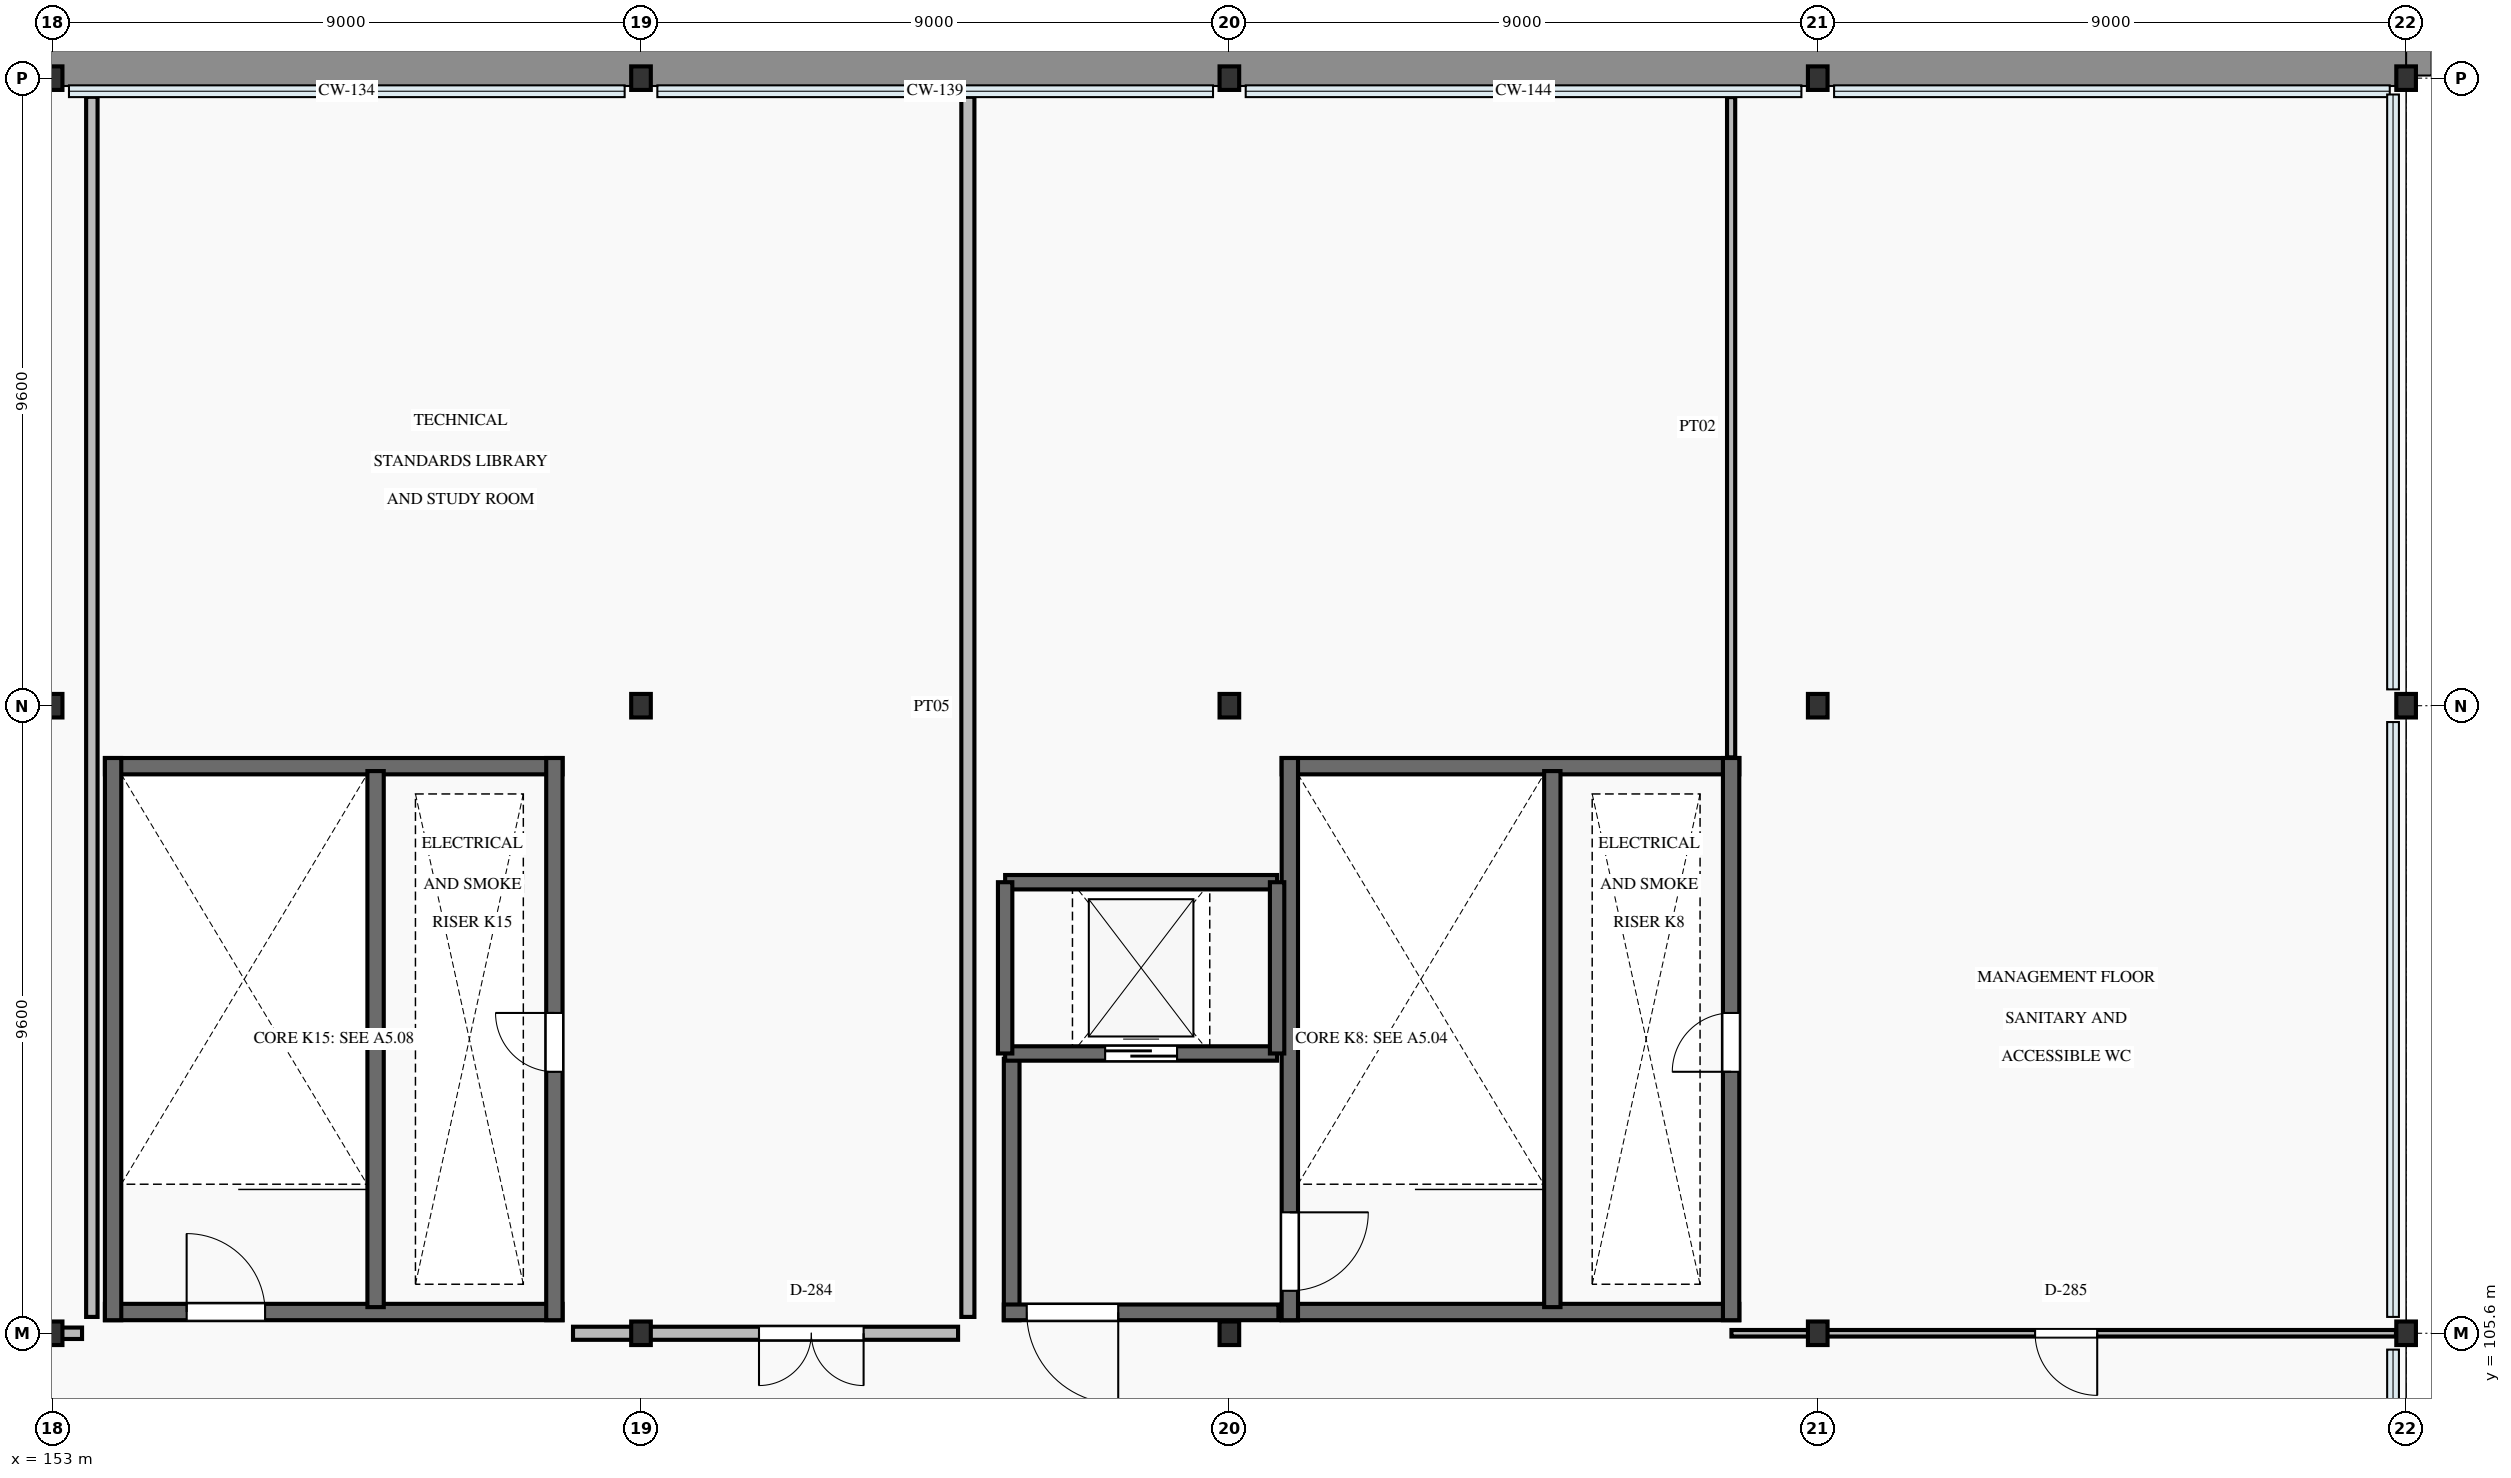
"""IFC4 building model, lengths in metres.
Left out: names, types, materials, properties, quantities, classifications, styles, units other than length and angle.
Written with IfcOpenShell. Run it as: python <this file> out.ifc"""

import sys

from ifc_helpers import new_model, si_unit, direction, frame, frame_2d, origin, origin_2d, place, context, subcontext, project, spatial, rectangle, i_section, extrude, element, fill, save


model = new_model("IFC4")
c1 = context("Model", 3, precision=1e-05, world=origin(), true_north=direction((0.0, 1.0)))
c2 = subcontext(c1, "Body", "Model", "MODEL_VIEW")
j1 = project(units=[si_unit("LENGTHUNIT", "METRE"), si_unit("PLANEANGLEUNIT", "RADIAN")], contexts=[c1])
p1 = place(None, origin())
s1 = spatial("IfcSite", under=j1, at=p1, CompositionType="ELEMENT")
p2 = place(p1, origin())
s2 = spatial("IfcBuilding", under=s1, at=p2, CompositionType="ELEMENT")
p3 = place(p2, frame((0.0, 0.0, 18.9)))
s3 = spatial("IfcBuildingStorey", under=s2, at=p3, CompositionType="ELEMENT", Elevation=18.9)
for number, where, z_axis, x_axis in (
    (1, (153.0, 105.6, 0.0), (0.0, 0.0, 1.0), (1.0, 0.0, 0.0)),
    (2, (153.0, 115.2, 0.0), (0.0, 0.0, 1.0), (1.0, 0.0, 0.0)),
    (3, (153.0, 124.8, 0.0), (0.0, 0.0, 1.0), (1.0, 0.0, 0.0)),
    (4, (162.0, 105.6, 0.0), (0.0, 0.0, 1.0), (1.0, 0.0, 0.0)),
    (5, (162.0, 115.2, 0.0), (0.0, 0.0, 1.0), (1.0, 0.0, 0.0)),
    (6, (162.0, 124.8, 0.0), (0.0, 0.0, 1.0), (1.0, 0.0, 0.0)),
    (7, (171.0, 105.6, 0.0), (0.0, 0.0, 1.0), (1.0, 0.0, 0.0)),
    (8, (171.0, 115.2, 0.0), (0.0, 0.0, 1.0), (1.0, 0.0, 0.0)),
    (9, (171.0, 124.8, 0.0), (0.0, 0.0, 1.0), (1.0, 0.0, 0.0)),
    (10, (180.0, 105.6, 0.0), (0.0, 0.0, 1.0), (1.0, 0.0, 0.0)),
    (11, (180.0, 115.2, 0.0), (0.0, 0.0, 1.0), (1.0, 0.0, 0.0)),
    (12, (180.0, 124.8, 0.0), (0.0, 0.0, 1.0), (1.0, 0.0, 0.0)),
    (13, (189.0, 105.6, 0.0), (0.0, 0.0, 1.0), (1.0, 0.0, 0.0)),
    (14, (189.0, 115.2, 0.0), (0.0, 0.0, 1.0), (1.0, 0.0, 0.0)),
    (15, (189.0, 124.8, 0.0), (0.0, 0.0, 1.0), (1.0, 0.0, 0.0)),
):
    element("IfcColumn", number, at=place(p3, frame(where, z_axis=z_axis, x_axis=x_axis)), inside=s3, PredefinedType="COLUMN", context=c2, shape_type="SweptSolid", body=[
        extrude(i_section(OverallWidth=0.3, OverallDepth=0.36, WebThickness=0.012, FlangeThickness=0.022, FilletRadius=0.027, at=origin_2d()), origin(), (0.0, 0.0, 1.0), 3.9),
    ])
for number, where, z_axis, x_axis in (
    (16, (171.8, 105.925, 0.0), (0.0, 0.0, 1.0), (1.0, 0.0, 0.0)),
    (17, (171.8, 114.275, 0.0), (0.0, 0.0, 1.0), (1.0, 0.0, 0.0)),
):
    element("IfcWall", number, at=place(p3, frame(where, z_axis=z_axis, x_axis=x_axis)), inside=s3, PredefinedType="SHEAR", context=c2, shape_type="SweptSolid", body=[
        extrude(rectangle(XDim=7.0, YDim=0.25, at=frame_2d((3.5, 0.0))), origin(), (0.0, 0.0, 1.0), 3.9),
    ])
p4 = place(p3, frame((171.925, 105.8, 0.0), z_axis=(0.0, 0.0, 1.0), x_axis=(0.0, 1.0, 0.0)))
e18 = element("IfcWall", 18, at=p4, inside=s3, PredefinedType="SHEAR", context=c2, shape_type="SweptSolid", body=[
    extrude(rectangle(XDim=8.6, YDim=0.25, at=frame_2d((4.3, 0.0))), origin(), (0.0, 0.0, 1.0), 3.9),
])
p5 = place(p4, frame((0.45, 0.0, 0.0)))
e19 = element("IfcOpeningElement", 19, at=p5, cuts=e18, PredefinedType="OPENING", context=c2, shape_type="SweptSolid", body=[
    extrude(rectangle(XDim=1.2, YDim=2.15, at=frame_2d((0.6, 1.075))), frame((0.0, 0.14, 0.0), z_axis=(0.0, -1.0, 0.0), x_axis=(1.0, 0.0, 0.0)), (0.0, 0.0, 1.0), 0.28),
])
p6 = place(p3, frame((178.675, 105.8, 0.0), z_axis=(0.0, 0.0, 1.0), x_axis=(0.0, 1.0, 0.0)))
e20 = element("IfcWall", 20, at=p6, inside=s3, PredefinedType="SHEAR", context=c2, shape_type="SweptSolid", body=[
    extrude(rectangle(XDim=8.6, YDim=0.25, at=frame_2d((4.3, 0.0))), origin(), (0.0, 0.0, 1.0), 3.9),
])
p7 = place(p6, frame((3.8, 0.0, 0.0)))
e21 = element("IfcOpeningElement", 21, at=p7, cuts=e20, PredefinedType="OPENING", context=c2, shape_type="SweptSolid", body=[
    extrude(rectangle(XDim=0.9, YDim=2.05, at=frame_2d((0.45, 1.025))), frame((0.0, 0.14, 0.0), z_axis=(0.0, -1.0, 0.0), x_axis=(1.0, 0.0, 0.0)), (0.0, 0.0, 1.0), 0.28),
])
p8 = place(p3, frame((175.94, 106.0, 0.0), z_axis=(0.0, 0.0, 1.0), x_axis=(0.0, 1.0, 0.0)))
e22 = element("IfcWall", 22, at=p8, inside=s3, PredefinedType="SHEAR", context=c2, shape_type="SweptSolid", body=[
    extrude(rectangle(XDim=8.2, YDim=0.25, at=frame_2d((4.1, 0.0))), origin(), (0.0, 0.0, 1.0), 3.9),
])
p9 = place(p3, frame((167.67, 105.8, 0.0), z_axis=(0.0, 0.0, 1.0), x_axis=(0.0, 1.0, 0.0)))
e23 = element("IfcWall", 23, at=p9, inside=s3, PredefinedType="SHEAR", context=c2, shape_type="SweptSolid", body=[
    extrude(rectangle(XDim=4.0, YDim=0.24, at=frame_2d((2.0, 0.0))), origin(), (0.0, 0.0, 1.0), 3.9),
])
p10 = place(p3, frame((167.55, 105.92, 0.0), z_axis=(0.0, 0.0, 1.0), x_axis=(1.0, 0.0, 0.0)))
e24 = element("IfcWall", 24, at=p10, inside=s3, PredefinedType="SHEAR", context=c2, shape_type="SweptSolid", body=[
    extrude(rectangle(XDim=4.2, YDim=0.24, at=frame_2d((2.1, 0.0))), origin(), (0.0, 0.0, 1.0), 3.9),
])
p11 = place(p10, frame((0.35, 0.0, 0.0)))
e25 = element("IfcOpeningElement", 25, at=p11, cuts=e24, PredefinedType="OPENING", context=c2, shape_type="SweptSolid", body=[
    extrude(rectangle(XDim=1.4, YDim=2.2, at=frame_2d((0.7, 1.1))), frame((0.0, 0.135, 0.0), z_axis=(0.0, -1.0, 0.0), x_axis=(1.0, 0.0, 0.0)), (0.0, 0.0, 1.0), 0.27),
])
p12 = place(p3, frame((153.8, 105.925, 0.0), z_axis=(0.0, 0.0, 1.0), x_axis=(1.0, 0.0, 0.0)))
e26 = element("IfcWall", 26, at=p12, inside=s3, PredefinedType="SHEAR", context=c2, shape_type="SweptSolid", body=[
    extrude(rectangle(XDim=7.0, YDim=0.25, at=frame_2d((3.5, 0.0))), origin(), (0.0, 0.0, 1.0), 3.9),
])
p13 = place(p12, frame((1.25, 0.0, 0.0)))
e27 = element("IfcOpeningElement", 27, at=p13, cuts=e26, PredefinedType="OPENING", context=c2, shape_type="SweptSolid", body=[
    extrude(rectangle(XDim=1.2, YDim=2.15, at=frame_2d((0.6, 1.075))), frame((0.0, 0.14, 0.0), z_axis=(0.0, -1.0, 0.0), x_axis=(1.0, 0.0, 0.0)), (0.0, 0.0, 1.0), 0.28),
])
p14 = place(p3, frame((153.8, 114.275, 0.0), z_axis=(0.0, 0.0, 1.0), x_axis=(1.0, 0.0, 0.0)))
e28 = element("IfcWall", 28, at=p14, inside=s3, PredefinedType="SHEAR", context=c2, shape_type="SweptSolid", body=[
    extrude(rectangle(XDim=7.0, YDim=0.25, at=frame_2d((3.5, 0.0))), origin(), (0.0, 0.0, 1.0), 3.9),
])
p15 = place(p3, frame((153.925, 105.8, 0.0), z_axis=(0.0, 0.0, 1.0), x_axis=(0.0, 1.0, 0.0)))
e29 = element("IfcWall", 29, at=p15, inside=s3, PredefinedType="SHEAR", context=c2, shape_type="SweptSolid", body=[
    extrude(rectangle(XDim=8.6, YDim=0.25, at=frame_2d((4.3, 0.0))), origin(), (0.0, 0.0, 1.0), 3.9),
])
p16 = place(p3, frame((160.675, 105.8, 0.0), z_axis=(0.0, 0.0, 1.0), x_axis=(0.0, 1.0, 0.0)))
e30 = element("IfcWall", 30, at=p16, inside=s3, PredefinedType="SHEAR", context=c2, shape_type="SweptSolid", body=[
    extrude(rectangle(XDim=8.6, YDim=0.25, at=frame_2d((4.3, 0.0))), origin(), (0.0, 0.0, 1.0), 3.9),
])
p17 = place(p16, frame((3.8, 0.0, 0.0)))
e31 = element("IfcOpeningElement", 31, at=p17, cuts=e30, PredefinedType="OPENING", context=c2, shape_type="SweptSolid", body=[
    extrude(rectangle(XDim=0.9, YDim=2.05, at=frame_2d((0.45, 1.025))), frame((0.0, 0.14, 0.0), z_axis=(0.0, -1.0, 0.0), x_axis=(1.0, 0.0, 0.0)), (0.0, 0.0, 1.0), 0.28),
])
p18 = place(p3, frame((157.94, 106.0, 0.0), z_axis=(0.0, 0.0, 1.0), x_axis=(0.0, 1.0, 0.0)))
e32 = element("IfcWall", 32, at=p18, inside=s3, PredefinedType="SHEAR", context=c2, shape_type="SweptSolid", body=[
    extrude(rectangle(XDim=8.2, YDim=0.25, at=frame_2d((4.1, 0.0))), origin(), (0.0, 0.0, 1.0), 3.9),
])
p19 = place(p3, frame((167.57, 109.88, 0.0), z_axis=(0.0, 0.0, 1.0), x_axis=(1.0, 0.0, 0.0)))
e33 = element("IfcWall", 33, at=p19, inside=s3, PredefinedType="SHEAR", context=c2, shape_type="SweptSolid", body=[
    extrude(rectangle(XDim=4.16, YDim=0.22, at=frame_2d((2.08, 0.0))), origin(), (0.0, 0.0, 1.0), 3.9),
])
p20 = place(p19, frame((1.53, 0.0, 0.0)))
e34 = element("IfcOpeningElement", 34, at=p20, cuts=e33, PredefinedType="OPENING", context=c2, shape_type="SweptSolid", body=[
    extrude(rectangle(XDim=1.1, YDim=2.15, at=frame_2d((0.55, 1.075))), frame((0.0, 0.125, 0.0), z_axis=(0.0, -1.0, 0.0), x_axis=(1.0, 0.0, 0.0)), (0.0, 0.0, 1.0), 0.25),
])
p21 = place(p3, frame((167.57, 112.5, 0.0), z_axis=(0.0, 0.0, 1.0), x_axis=(1.0, 0.0, 0.0)))
e35 = element("IfcWall", 35, at=p21, inside=s3, PredefinedType="SHEAR", context=c2, shape_type="SweptSolid", body=[
    extrude(rectangle(XDim=4.16, YDim=0.22, at=frame_2d((2.08, 0.0))), origin(), (0.0, 0.0, 1.0), 3.9),
])
for number, where, z_axis, x_axis in (
    (36, (167.57, 109.88, 0.0), (0.0, 0.0, 1.0), (0.0, 1.0, 0.0)),
    (37, (171.73, 109.88, 0.0), (0.0, 0.0, 1.0), (0.0, 1.0, 0.0)),
):
    element("IfcWall", number, at=place(p3, frame(where, z_axis=z_axis, x_axis=x_axis)), inside=s3, PredefinedType="SHEAR", context=c2, shape_type="SweptSolid", body=[
        extrude(rectangle(XDim=2.62, YDim=0.22, at=frame_2d((1.31, 0.0))), origin(), (0.0, 0.0, 1.0), 3.9),
    ])
p22 = place(p3, frame((139.15, 105.6, 0.0), z_axis=(0.0, 0.0, 1.0), x_axis=(1.0, 0.0, 0.0)))
e38 = element("IfcWall", 38, at=p22, inside=s3, PredefinedType="PARTITIONING", context=c2, shape_type="SweptSolid", body=[
    extrude(rectangle(XDim=14.3, YDim=0.175, at=frame_2d((7.15, 0.0))), origin(), (0.0, 0.0, 1.0), 3.135),
])
p23 = place(p22, frame((7.05, 0.0, 0.0)))
e39 = element("IfcOpeningElement", 39, at=p23, cuts=e38, PredefinedType="OPENING", context=c2, shape_type="SweptSolid", body=[
    extrude(rectangle(XDim=1.6, YDim=2.25, at=frame_2d((0.8, 1.125))), frame((0.0, 0.103, 0.0), z_axis=(0.0, -1.0, 0.0), x_axis=(1.0, 0.0, 0.0)), (0.0, 0.0, 1.0), 0.205),
])
p24 = place(p3, frame((160.96, 105.6, 0.0), z_axis=(0.0, 0.0, 1.0), x_axis=(1.0, 0.0, 0.0)))
e40 = element("IfcWall", 40, at=p24, inside=s3, PredefinedType="PARTITIONING", context=c2, shape_type="SweptSolid", body=[
    extrude(rectangle(XDim=5.89, YDim=0.2, at=frame_2d((2.945, 0.0))), origin(), (0.0, 0.0, 1.0), 3.135),
])
p25 = place(p24, frame((2.845, 0.0, 0.0)))
e41 = element("IfcOpeningElement", 41, at=p25, cuts=e40, PredefinedType="OPENING", context=c2, shape_type="SweptSolid", body=[
    extrude(rectangle(XDim=1.6, YDim=2.25, at=frame_2d((0.8, 1.125))), frame((0.0, 0.115, 0.0), z_axis=(0.0, -1.0, 0.0), x_axis=(1.0, 0.0, 0.0)), (0.0, 0.0, 1.0), 0.23),
])
p26 = place(p3, frame((178.68, 105.6, 0.0), z_axis=(0.0, 0.0, 1.0), x_axis=(1.0, 0.0, 0.0)))
e42 = element("IfcWall", 42, at=p26, inside=s3, PredefinedType="PARTITIONING", context=c2, shape_type="SweptSolid", body=[
    extrude(rectangle(XDim=10.165, YDim=0.1, at=frame_2d((5.083, 0.0))), origin(), (0.0, 0.0, 1.0), 3.135),
])
p27 = place(p26, frame((4.645, 0.0, 0.0)))
e43 = element("IfcOpeningElement", 43, at=p27, cuts=e42, PredefinedType="OPENING", context=c2, shape_type="SweptSolid", body=[
    extrude(rectangle(XDim=0.95, YDim=2.1, at=frame_2d((0.475, 1.05))), frame((0.0, 0.065, 0.0), z_axis=(0.0, -1.0, 0.0), x_axis=(1.0, 0.0, 0.0)), (0.0, 0.0, 1.0), 0.13),
])
p28 = place(p3, frame((153.6, 105.85, 0.0), z_axis=(0.0, 0.0, 1.0), x_axis=(0.0, 1.0, 0.0)))
e44 = element("IfcWall", 44, at=p28, inside=s3, PredefinedType="PARTITIONING", context=c2, shape_type="SweptSolid", body=[
    extrude(rectangle(XDim=18.665, YDim=0.175, at=frame_2d((9.333, 0.0))), origin(), (0.0, 0.0, 1.0), 3.64),
])
p29 = place(p3, frame((167.0, 105.85, 0.0), z_axis=(0.0, 0.0, 1.0), x_axis=(0.0, 1.0, 0.0)))
e45 = element("IfcWall", 45, at=p29, inside=s3, PredefinedType="PARTITIONING", context=c2, shape_type="SweptSolid", body=[
    extrude(rectangle(XDim=18.665, YDim=0.2, at=frame_2d((9.333, 0.0))), origin(), (0.0, 0.0, 1.0), 3.64),
])
p30 = place(p3, frame((178.675, 114.41, 0.0), z_axis=(0.0, 0.0, 1.0), x_axis=(0.0, 1.0, 0.0)))
e46 = element("IfcWall", 46, at=p30, inside=s3, PredefinedType="PARTITIONING", context=c2, shape_type="SweptSolid", body=[
    extrude(rectangle(XDim=10.1, YDim=0.125, at=frame_2d((5.05, 0.0))), origin(), (0.0, 0.0, 1.0), 3.64),
])
p31 = place(p5, frame((1.2, 0.0, 0.0), z_axis=(0.0, 0.0, 1.0), x_axis=(-1.0, 0.0, 0.0)))
e47 = element("IfcDoor", 47, at=p31, inside=s3, OperationType="SINGLE_SWING_RIGHT", PredefinedType="DOOR", context=c2, shape_type="SweptSolid", body=[
    extrude(rectangle(XDim=1.2, YDim=2.15, at=frame_2d((0.6, 1.075))), frame((0.0, 0.025, 0.0), z_axis=(0.0, -1.0, 0.0), x_axis=(1.0, 0.0, 0.0)), (0.0, 0.0, 1.0), 0.05),
])
fill(e19, e47)
p32 = place(p7, origin())
e48 = element("IfcDoor", 48, at=p32, inside=s3, OperationType="SINGLE_SWING_LEFT", PredefinedType="DOOR", context=c2, shape_type="SweptSolid", body=[
    extrude(rectangle(XDim=0.9, YDim=2.05, at=frame_2d((0.45, 1.025))), frame((0.0, 0.025, 0.0), z_axis=(0.0, -1.0, 0.0), x_axis=(1.0, 0.0, 0.0)), (0.0, 0.0, 1.0), 0.05),
])
fill(e21, e48)
p33 = place(p11, frame((1.4, 0.0, 0.0), z_axis=(0.0, 0.0, 1.0), x_axis=(-1.0, 0.0, 0.0)))
e49 = element("IfcDoor", 49, at=p33, inside=s3, OperationType="SINGLE_SWING_RIGHT", PredefinedType="DOOR", context=c2, shape_type="SweptSolid", body=[
    extrude(rectangle(XDim=1.4, YDim=2.2, at=frame_2d((0.7, 1.1))), frame((0.0, 0.025, 0.0), z_axis=(0.0, -1.0, 0.0), x_axis=(1.0, 0.0, 0.0)), (0.0, 0.0, 1.0), 0.05),
])
fill(e25, e49)
p34 = place(p13, origin())
e50 = element("IfcDoor", 50, at=p34, inside=s3, OperationType="SINGLE_SWING_LEFT", PredefinedType="DOOR", context=c2, shape_type="SweptSolid", body=[
    extrude(rectangle(XDim=1.2, YDim=2.15, at=frame_2d((0.6, 1.075))), frame((0.0, 0.025, 0.0), z_axis=(0.0, -1.0, 0.0), x_axis=(1.0, 0.0, 0.0)), (0.0, 0.0, 1.0), 0.05),
])
fill(e27, e50)
p35 = place(p17, origin())
e51 = element("IfcDoor", 51, at=p35, inside=s3, OperationType="SINGLE_SWING_RIGHT", PredefinedType="DOOR", context=c2, shape_type="SweptSolid", body=[
    extrude(rectangle(XDim=0.9, YDim=2.05, at=frame_2d((0.45, 1.025))), frame((0.0, 0.025, 0.0), z_axis=(0.0, -1.0, 0.0), x_axis=(1.0, 0.0, 0.0)), (0.0, 0.0, 1.0), 0.05),
])
fill(e31, e51)
p36 = place(p20, origin())
e52 = element("IfcDoor", 52, at=p36, inside=s3, OperationType="SLIDING_TO_LEFT", PredefinedType="DOOR", context=c2, shape_type="SweptSolid", body=[
    extrude(rectangle(XDim=1.1, YDim=2.15, at=frame_2d((0.55, 1.075))), frame((0.0, 0.025, 0.0), z_axis=(0.0, -1.0, 0.0), x_axis=(1.0, 0.0, 0.0)), (0.0, 0.0, 1.0), 0.05),
])
fill(e34, e52)
p37 = place(p25, frame((1.6, 0.0, 0.0), z_axis=(0.0, 0.0, 1.0), x_axis=(-1.0, 0.0, 0.0)))
e53 = element("IfcDoor", 53, at=p37, inside=s3, OperationType="DOUBLE_DOOR_SINGLE_SWING", PredefinedType="DOOR", context=c2, shape_type="SweptSolid", body=[
    extrude(rectangle(XDim=1.6, YDim=2.25, at=frame_2d((0.8, 1.125))), frame((0.0, 0.025, 0.0), z_axis=(0.0, -1.0, 0.0), x_axis=(1.0, 0.0, 0.0)), (0.0, 0.0, 1.0), 0.05),
])
fill(e41, e53)
p38 = place(p27, frame((0.95, 0.0, 0.0), z_axis=(0.0, 0.0, 1.0), x_axis=(-1.0, 0.0, 0.0)))
e54 = element("IfcDoor", 54, at=p38, inside=s3, OperationType="SINGLE_SWING_RIGHT", PredefinedType="DOOR", context=c2, shape_type="SweptSolid", body=[
    extrude(rectangle(XDim=0.95, YDim=2.1, at=frame_2d((0.475, 1.05))), frame((0.0, 0.025, 0.0), z_axis=(0.0, -1.0, 0.0), x_axis=(1.0, 0.0, 0.0)), (0.0, 0.0, 1.0), 0.05),
])
fill(e43, e54)
save(model, sys.argv[1])
